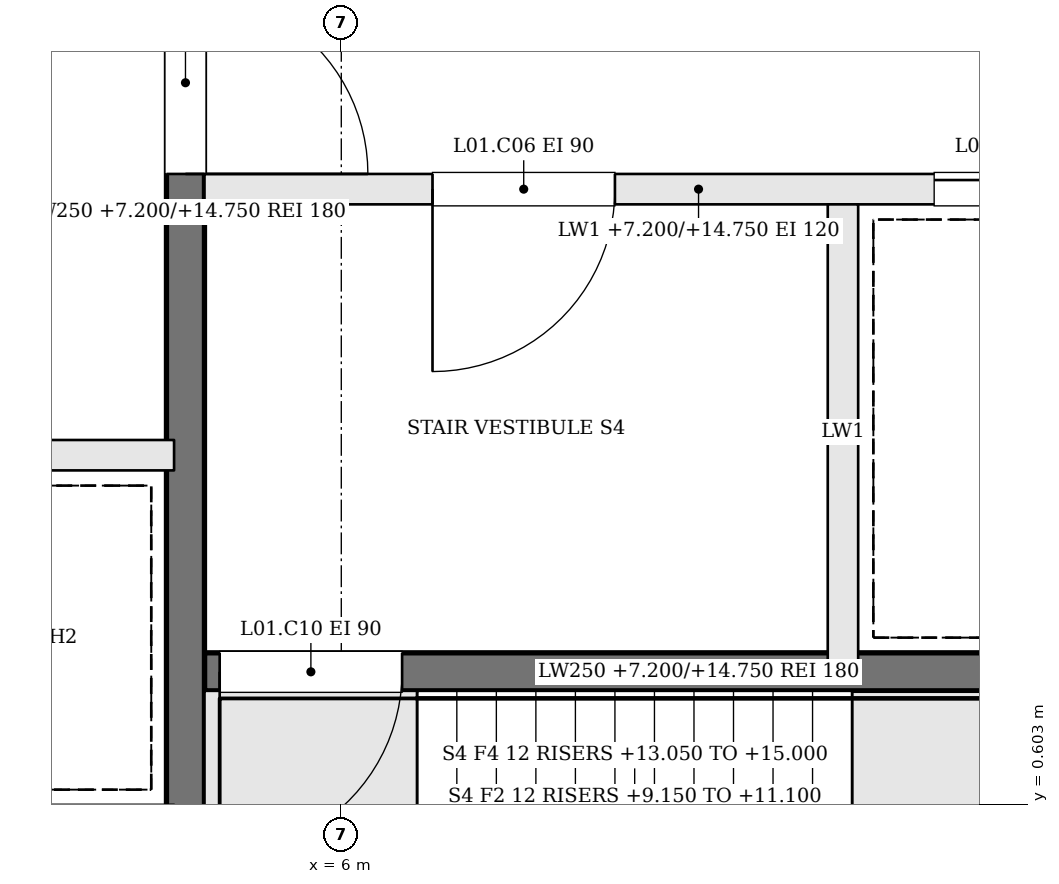
"""IFC4 building model, lengths in metres.
Left out: names, types, materials, properties, quantities, classifications, styles, units other than length and angle.
Written with IfcOpenShell. Run it as: python <this file> out.ifc"""

import sys

from ifc_helpers import new_model, si_unit, direction, frame, frame_2d, origin, place, context, subcontext, project, spatial, rectangle, extrude, element, fill, save


model = new_model("IFC4")
c1 = context("Model", 3, precision=1e-05, world=origin(), true_north=direction((0.0, 1.0)))
c2 = subcontext(c1, "Body", "Model", "MODEL_VIEW")
j1 = project(units=[si_unit("LENGTHUNIT", "METRE"), si_unit("PLANEANGLEUNIT", "RADIAN")], contexts=[c1])
p1 = place(None, origin())
s1 = spatial("IfcSite", under=j1, at=p1, CompositionType="ELEMENT")
p2 = place(p1, origin())
s2 = spatial("IfcBuilding", under=s1, at=p2, CompositionType="ELEMENT")
p3 = place(p2, frame((0.0, 0.0, 7.2)))
s3 = spatial("IfcBuildingStorey", under=s2, at=p3, CompositionType="ELEMENT", Elevation=7.2)
p4 = place(p3, frame((11.6, 4.65, 0.0), z_axis=(0.0, 0.0, 1.0), x_axis=(-1.0, 0.0, 0.0)))
e1 = element("IfcWall", 1, at=p4, inside=s3, PredefinedType="SOLIDWALL", context=c2, shape_type="SweptSolid", body=[
    extrude(rectangle(XDim=6.5, YDim=0.2, at=frame_2d((3.25, 0.0))), origin(), (0.0, 0.0, 1.0), 7.55),
])
p5 = place(p4, frame((3.8, 0.0, 0.0)))
e2 = element("IfcOpeningElement", 2, at=p5, cuts=e1, PredefinedType="OPENING", context=c2, shape_type="SweptSolid", body=[
    extrude(rectangle(XDim=1.2, YDim=2.1, at=frame_2d((0.6, 1.05))), frame((0.0, 0.11, 0.0), z_axis=(0.0, -1.0, 0.0), x_axis=(1.0, 0.0, 0.0)), (0.0, 0.0, 1.0), 0.22),
])
p6 = place(p4, frame((0.5, 0.0, 0.0)))
e3 = element("IfcOpeningElement", 3, at=p6, cuts=e1, PredefinedType="OPENING", context=c2, shape_type="SweptSolid", body=[
    extrude(rectangle(XDim=1.2, YDim=2.1, at=frame_2d((0.6, 1.05))), frame((0.0, 0.11, 0.0), z_axis=(0.0, -1.0, 0.0), x_axis=(1.0, 0.0, 0.0)), (0.0, 0.0, 1.0), 0.22),
])
p7 = place(p3, frame((11.6, 1.475, 0.0), z_axis=(0.0, 0.0, 1.0), x_axis=(-1.0, 0.0, 0.0)))
e4 = element("IfcWall", 4, at=p7, inside=s3, PredefinedType="SOLIDWALL", context=c2, shape_type="SweptSolid", body=[
    extrude(rectangle(XDim=6.5, YDim=0.25, at=frame_2d((3.25, 0.0))), origin(), (0.0, 0.0, 1.0), 7.55),
])
p8 = place(p7, frame((5.2, 0.0, 0.0)))
e5 = element("IfcOpeningElement", 5, at=p8, cuts=e4, PredefinedType="OPENING", context=c2, shape_type="SweptSolid", body=[
    extrude(rectangle(XDim=1.2, YDim=2.1, at=frame_2d((0.6, 1.05))), frame((0.0, 0.135, 0.0), z_axis=(0.0, -1.0, 0.0), x_axis=(1.0, 0.0, 0.0)), (0.0, 0.0, 1.0), 0.27),
])
p9 = place(p3, frame((9.3, 4.55, 0.0), z_axis=(0.0, 0.0, 1.0), x_axis=(0.0, -1.0, 0.0)))
e6 = element("IfcWall", 6, at=p9, inside=s3, PredefinedType="SOLIDWALL", context=c2, shape_type="SweptSolid", body=[
    extrude(rectangle(XDim=3.0, YDim=0.2, at=frame_2d((1.5, 0.0))), origin(), (0.0, 0.0, 1.0), 7.55),
])
p10 = place(p3, frame((4.975, 10.6, 0.0), z_axis=(0.0, 0.0, 1.0), x_axis=(0.0, -1.0, 0.0)))
e7 = element("IfcWall", 7, at=p10, inside=s3, PredefinedType="SOLIDWALL", context=c2, shape_type="SweptSolid", body=[
    extrude(rectangle(XDim=12.2, YDim=0.25, at=frame_2d((6.1, 0.0))), origin(), (0.0, 0.0, 1.0), 7.55),
])
p11 = place(p10, frame((4.65, 0.0, 0.0)))
e8 = element("IfcOpeningElement", 8, at=p11, cuts=e7, PredefinedType="OPENING", context=c2, shape_type="SweptSolid", body=[
    extrude(rectangle(XDim=1.2, YDim=2.1, at=frame_2d((0.6, 1.05))), frame((0.0, 0.135, 0.0), z_axis=(0.0, -1.0, 0.0), x_axis=(1.0, 0.0, 0.0)), (0.0, 0.0, 1.0), 0.27),
])
p12 = place(p3, frame((-4.9, 2.9, 0.0), z_axis=(0.0, 0.0, 1.0), x_axis=(1.0, 0.0, 0.0)))
e9 = element("IfcWall", 9, at=p12, inside=s3, PredefinedType="SOLIDWALL", context=c2, shape_type="SweptSolid", body=[
    extrude(rectangle(XDim=9.8, YDim=0.2, at=frame_2d((4.9, 0.0))), origin(), (0.0, 0.0, 1.0), 7.55),
])
p13 = place(p12, frame((0.675, 0.0, 0.0)))
e10 = element("IfcOpeningElement", 10, at=p13, cuts=e9, PredefinedType="OPENING", context=c2, shape_type="SweptSolid", body=[
    extrude(rectangle(XDim=1.1, YDim=2.1, at=frame_2d((0.55, 1.05))), frame((0.0, 0.11, 0.0), z_axis=(0.0, -1.0, 0.0), x_axis=(1.0, 0.0, 0.0)), (0.0, 0.0, 1.0), 0.22),
])
p14 = place(p12, frame((3.125, 0.0, 0.0)))
e11 = element("IfcOpeningElement", 11, at=p14, cuts=e9, PredefinedType="OPENING", context=c2, shape_type="SweptSolid", body=[
    extrude(rectangle(XDim=1.1, YDim=2.1, at=frame_2d((0.55, 1.05))), frame((0.0, 0.11, 0.0), z_axis=(0.0, -1.0, 0.0), x_axis=(1.0, 0.0, 0.0)), (0.0, 0.0, 1.0), 0.22),
])
p15 = place(p11, origin())
e12 = element("IfcDoor", 12, at=p15, inside=s3, OperationType="SINGLE_SWING_RIGHT", PredefinedType="DOOR", context=c2, shape_type="SweptSolid", body=[
    extrude(rectangle(XDim=1.2, YDim=2.1, at=frame_2d((0.6, 1.05))), frame((0.0, 0.025, 0.0), z_axis=(0.0, -1.0, 0.0), x_axis=(1.0, 0.0, 0.0)), (0.0, 0.0, 1.0), 0.05),
])
fill(e8, e12)
p16 = place(p5, origin())
e13 = element("IfcDoor", 13, at=p16, inside=s3, OperationType="SINGLE_SWING_RIGHT", PredefinedType="DOOR", context=c2, shape_type="SweptSolid", body=[
    extrude(rectangle(XDim=1.2, YDim=2.1, at=frame_2d((0.6, 1.05))), frame((0.0, 0.025, 0.0), z_axis=(0.0, -1.0, 0.0), x_axis=(1.0, 0.0, 0.0)), (0.0, 0.0, 1.0), 0.05),
])
fill(e2, e13)
p17 = place(p8, origin())
e14 = element("IfcDoor", 14, at=p17, inside=s3, OperationType="SINGLE_SWING_RIGHT", PredefinedType="DOOR", context=c2, shape_type="SweptSolid", body=[
    extrude(rectangle(XDim=1.2, YDim=2.1, at=frame_2d((0.6, 1.05))), frame((0.0, 0.025, 0.0), z_axis=(0.0, -1.0, 0.0), x_axis=(1.0, 0.0, 0.0)), (0.0, 0.0, 1.0), 0.05),
])
fill(e5, e14)
p18 = place(p6, origin())
e15 = element("IfcDoor", 15, at=p18, inside=s3, OperationType="SLIDING_TO_RIGHT", PredefinedType="DOOR", context=c2, shape_type="SweptSolid", body=[
    extrude(rectangle(XDim=1.2, YDim=2.1, at=frame_2d((0.6, 1.05))), frame((0.0, 0.025, 0.0), z_axis=(0.0, -1.0, 0.0), x_axis=(1.0, 0.0, 0.0)), (0.0, 0.0, 1.0), 0.05),
])
fill(e3, e15)
save(model, sys.argv[1])
